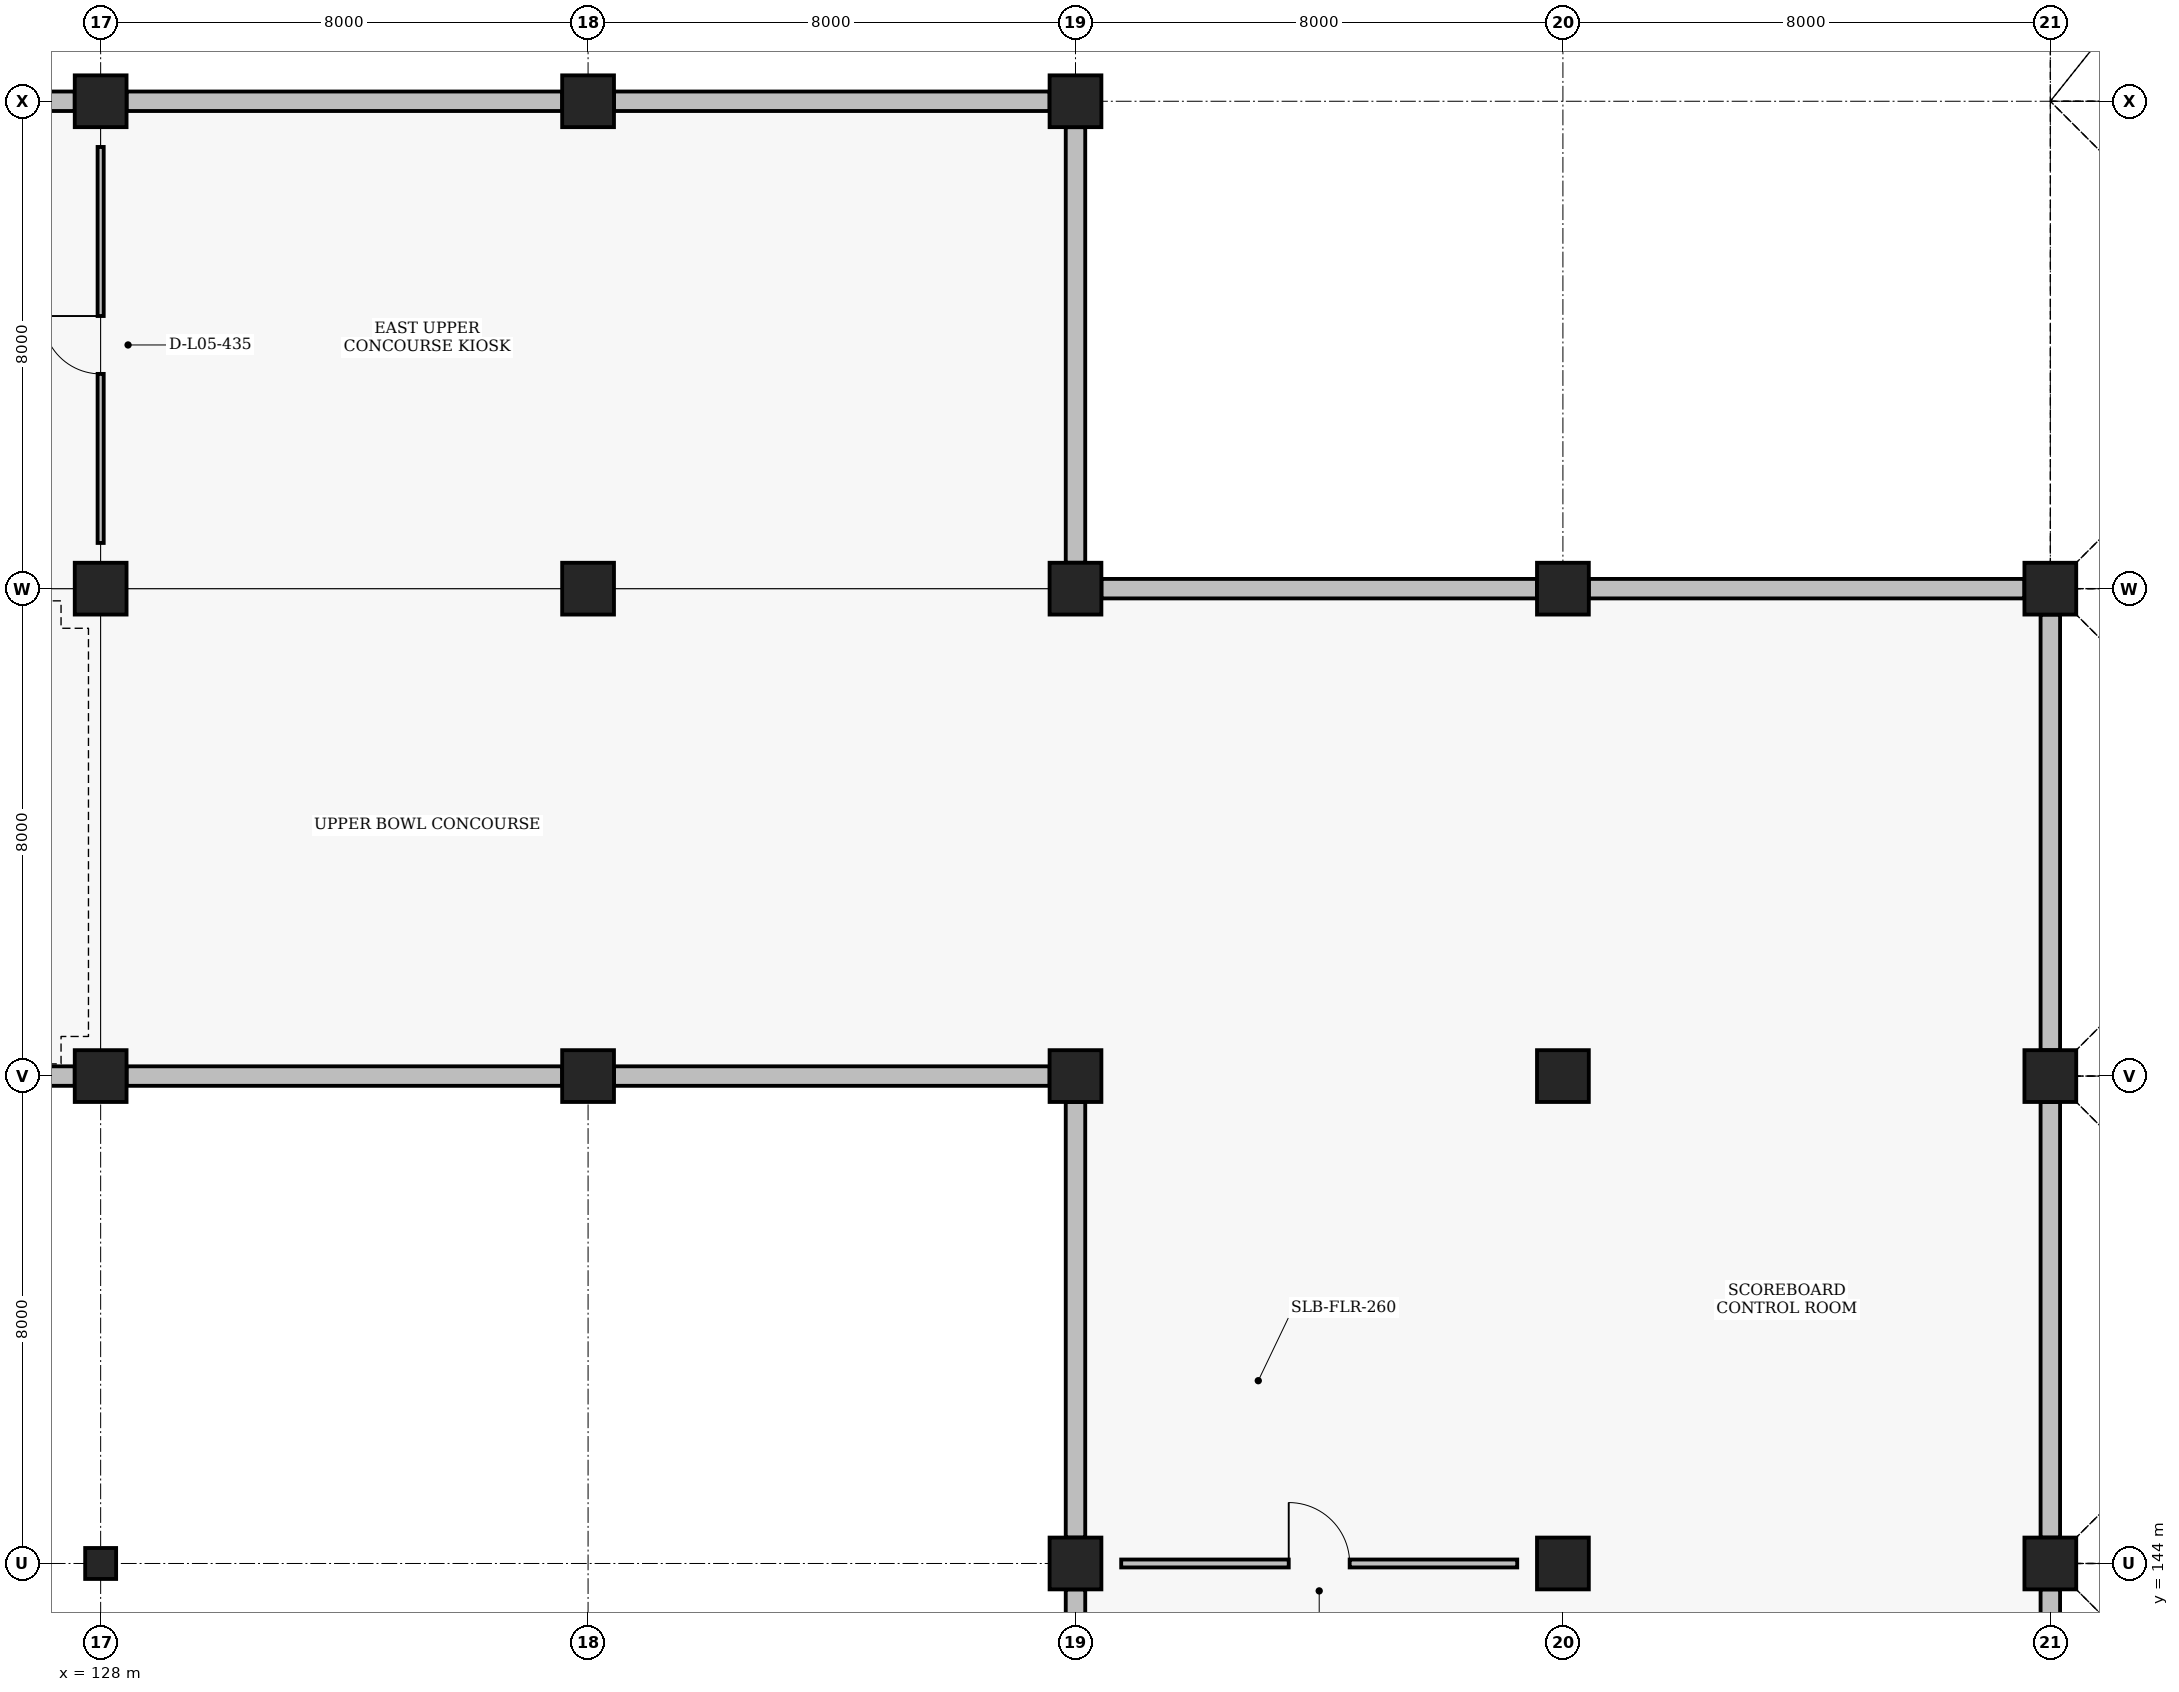
"""IFC4 building model, lengths in metres.
Left out: names, types, materials, properties, quantities, classifications, styles, units other than length and angle.
Written with IfcOpenShell. Run it as: python <this file> out.ifc"""

import sys

from ifc_helpers import new_model, si_unit, direction, frame, frame_2d, origin, origin_2d, place, context, subcontext, project, spatial, rectangle, hollow_circle, extrude, element, fill, save


model = new_model("IFC4")
c1 = context("Model", 3, precision=1e-05, world=origin(), true_north=direction((0.0, 1.0)))
c2 = subcontext(c1, "Body", "Model", "MODEL_VIEW")
j1 = project(units=[si_unit("LENGTHUNIT", "METRE"), si_unit("PLANEANGLEUNIT", "RADIAN")], contexts=[c1])
p1 = place(None, origin())
s1 = spatial("IfcSite", under=j1, at=p1, CompositionType="ELEMENT")
p2 = place(p1, origin())
s2 = spatial("IfcBuilding", under=s1, at=p2, CompositionType="ELEMENT")
p3 = place(p2, frame((0.0, 0.0, 18.6)))
s3 = spatial("IfcBuildingStorey", under=s2, at=p3, CompositionType="ELEMENT", Elevation=18.6)
for number, where, z_axis, x_axis in (
    (1, (128.0, 152.0, 0.0), (0.0, 0.0, 1.0), (1.0, 0.0, 0.0)),
    (2, (128.0, 160.0, 0.0), (0.0, 0.0, 1.0), (1.0, 0.0, 0.0)),
    (3, (128.0, 168.0, 0.0), (0.0, 0.0, 1.0), (1.0, 0.0, 0.0)),
    (4, (136.0, 152.0, 0.0), (0.0, 0.0, 1.0), (1.0, 0.0, 0.0)),
    (5, (136.0, 160.0, 0.0), (0.0, 0.0, 1.0), (1.0, 0.0, 0.0)),
    (6, (136.0, 168.0, 0.0), (0.0, 0.0, 1.0), (1.0, 0.0, 0.0)),
    (7, (144.0, 144.0, 0.0), (0.0, 0.0, 1.0), (1.0, 0.0, 0.0)),
    (8, (144.0, 152.0, 0.0), (0.0, 0.0, 1.0), (1.0, 0.0, 0.0)),
    (9, (144.0, 160.0, 0.0), (0.0, 0.0, 1.0), (1.0, 0.0, 0.0)),
    (10, (144.0, 168.0, 0.0), (0.0, 0.0, 1.0), (1.0, 0.0, 0.0)),
    (11, (152.0, 144.0, 0.0), (0.0, 0.0, 1.0), (1.0, 0.0, 0.0)),
    (12, (152.0, 152.0, 0.0), (0.0, 0.0, 1.0), (1.0, 0.0, 0.0)),
    (13, (152.0, 160.0, 0.0), (0.0, 0.0, 1.0), (1.0, 0.0, 0.0)),
    (14, (160.0, 144.0, 0.0), (0.0, 0.0, 1.0), (1.0, 0.0, 0.0)),
    (15, (160.0, 152.0, 0.0), (0.0, 0.0, 1.0), (1.0, 0.0, 0.0)),
    (16, (160.0, 160.0, 0.0), (0.0, 0.0, 1.0), (1.0, 0.0, 0.0)),
):
    element("IfcColumn", number, at=place(p3, frame(where, z_axis=z_axis, x_axis=x_axis)), inside=s3, PredefinedType="COLUMN", context=c2, shape_type="SweptSolid", body=[
        extrude(rectangle(XDim=0.85, YDim=0.85, at=origin_2d()), origin(), (0.0, 0.0, 1.0), 4.2),
    ])
p4 = place(p3, frame((128.0, 144.0, 0.0), z_axis=(0.0, 0.0, 1.0), x_axis=(1.0, 0.0, 0.0)))
e17 = element("IfcColumn", 17, at=p4, inside=s3, PredefinedType="COLUMN", context=c2, shape_type="SweptSolid", body=[
    extrude(hollow_circle(Radius=0.254, WallThickness=0.025, at=origin_2d()), origin(), (0.0, 0.0, 1.0), 4.2),
])
for number, where, z_axis, x_axis in (
    (18, (120.425, 152.0, 0.0), (0.0, 0.0, 1.0), (1.0, 0.0, 0.0)),
    (19, (120.425, 168.0, 0.0), (0.0, 0.0, 1.0), (1.0, 0.0, 0.0)),
    (20, (128.425, 152.0, 0.0), (0.0, 0.0, 1.0), (1.0, 0.0, 0.0)),
    (21, (128.425, 168.0, 0.0), (0.0, 0.0, 1.0), (1.0, 0.0, 0.0)),
    (22, (136.425, 152.0, 0.0), (0.0, 0.0, 1.0), (1.0, 0.0, 0.0)),
    (23, (136.425, 168.0, 0.0), (0.0, 0.0, 1.0), (1.0, 0.0, 0.0)),
    (24, (144.0, 160.425, 0.0), (0.0, 0.0, 1.0), (0.0, 1.0, 0.0)),
    (25, (144.0, 136.425, 0.0), (0.0, 0.0, 1.0), (0.0, 1.0, 0.0)),
    (26, (144.0, 144.425, 0.0), (0.0, 0.0, 1.0), (0.0, 1.0, 0.0)),
    (27, (144.425, 160.0, 0.0), (0.0, 0.0, 1.0), (1.0, 0.0, 0.0)),
    (28, (160.0, 136.425, 0.0), (0.0, 0.0, 1.0), (0.0, 1.0, 0.0)),
    (29, (160.0, 144.425, 0.0), (0.0, 0.0, 1.0), (0.0, 1.0, 0.0)),
    (30, (152.425, 160.0, 0.0), (0.0, 0.0, 1.0), (1.0, 0.0, 0.0)),
    (31, (160.0, 152.425, 0.0), (0.0, 0.0, 1.0), (0.0, 1.0, 0.0)),
):
    element("IfcWall", number, at=place(p3, frame(where, z_axis=z_axis, x_axis=x_axis)), inside=s3, PredefinedType="SOLIDWALL", context=c2, shape_type="SweptSolid", body=[
        extrude(rectangle(XDim=7.15, YDim=0.32, at=frame_2d((3.575, 0.0))), origin(), (0.0, 0.0, 1.0), 3.35),
    ])
p5 = place(p3, frame((128.0, 160.75, 0.0), z_axis=(0.0, 0.0, 1.0), x_axis=(0.0, 1.0, 0.0)))
e32 = element("IfcWall", 32, at=p5, inside=s3, PredefinedType="PARTITIONING", context=c2, shape_type="SweptSolid", body=[
    extrude(rectangle(XDim=6.5, YDim=0.1, at=frame_2d((3.25, 0.0))), origin(), (0.0, 0.0, 1.0), 3.37),
])
p6 = place(p5, frame((2.775, 0.0, 0.0)))
e33 = element("IfcOpeningElement", 33, at=p6, cuts=e32, PredefinedType="OPENING", context=c2, shape_type="SweptSolid", body=[
    extrude(rectangle(XDim=0.95, YDim=2.1, at=frame_2d((0.475, 1.05))), frame((0.0, 0.06, 0.0), z_axis=(0.0, -1.0, 0.0), x_axis=(1.0, 0.0, 0.0)), (0.0, 0.0, 1.0), 0.12),
])
p7 = place(p3, frame((144.75, 144.0, 0.0), z_axis=(0.0, 0.0, 1.0), x_axis=(1.0, 0.0, 0.0)))
e34 = element("IfcWall", 34, at=p7, inside=s3, PredefinedType="PARTITIONING", context=c2, shape_type="SweptSolid", body=[
    extrude(rectangle(XDim=6.5, YDim=0.13, at=frame_2d((3.25, 0.0))), origin(), (0.0, 0.0, 1.0), 3.47),
])
p8 = place(p7, frame((2.75, 0.0, 0.0)))
e35 = element("IfcOpeningElement", 35, at=p8, cuts=e34, PredefinedType="OPENING", context=c2, shape_type="SweptSolid", body=[
    extrude(rectangle(XDim=1.0, YDim=2.1, at=frame_2d((0.5, 1.05))), frame((0.0, 0.075, 0.0), z_axis=(0.0, -1.0, 0.0), x_axis=(1.0, 0.0, 0.0)), (0.0, 0.0, 1.0), 0.15),
])
p9 = place(p6, origin())
e36 = element("IfcDoor", 36, at=p9, inside=s3, OperationType="SINGLE_SWING_RIGHT", PredefinedType="DOOR", context=c2, shape_type="SweptSolid", body=[
    extrude(rectangle(XDim=0.95, YDim=2.1, at=frame_2d((0.475, 1.05))), frame((0.0, 0.025, 0.0), z_axis=(0.0, -1.0, 0.0), x_axis=(1.0, 0.0, 0.0)), (0.0, 0.0, 1.0), 0.05),
])
fill(e33, e36)
p10 = place(p8, origin())
e37 = element("IfcDoor", 37, at=p10, inside=s3, OperationType="SINGLE_SWING_LEFT", PredefinedType="DOOR", context=c2, shape_type="SweptSolid", body=[
    extrude(rectangle(XDim=1.0, YDim=2.1, at=frame_2d((0.5, 1.05))), frame((0.0, 0.025, 0.0), z_axis=(0.0, -1.0, 0.0), x_axis=(1.0, 0.0, 0.0)), (0.0, 0.0, 1.0), 0.05),
])
fill(e35, e37)
save(model, sys.argv[1])
